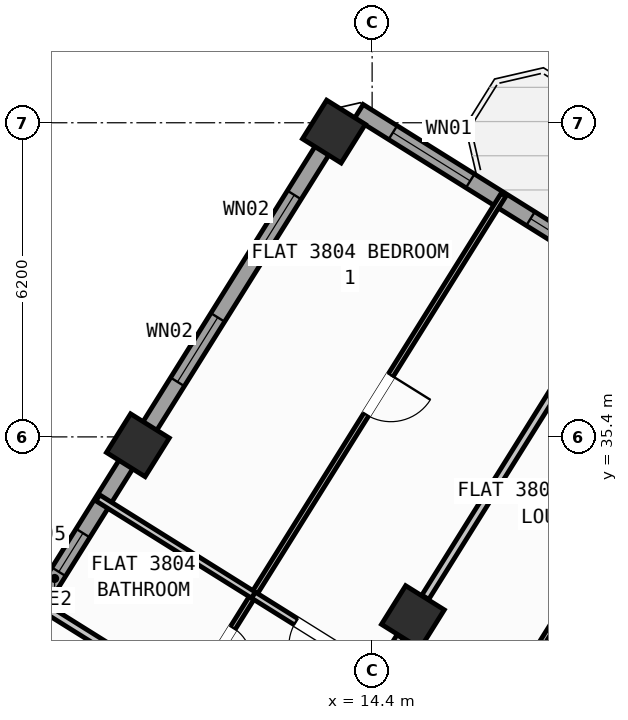
"""IFC4 building model, lengths in metres.
Left out: names, types, materials, properties, quantities, classifications, styles, units other than length and angle.
Written with IfcOpenShell. Run it as: python <this file> out.ifc"""

import sys

from ifc_helpers import new_model, si_unit, direction, frame, frame_2d, origin, origin_2d, place, context, subcontext, project, spatial, rectangle, hollow_rectangle, extrude, source, transform, mapped, element, fill, save


model = new_model("IFC4")
c1 = context("Model", 3, precision=1e-05, world=origin(), true_north=direction((0.0, 1.0)))
c2 = subcontext(c1, "Body", "Model", "MODEL_VIEW")
j1 = project(units=[si_unit("LENGTHUNIT", "METRE"), si_unit("PLANEANGLEUNIT", "RADIAN")], contexts=[c1])
p1 = place(None, origin())
s1 = spatial("IfcSite", under=j1, at=p1, CompositionType="ELEMENT")
p2 = place(p1, origin())
s2 = spatial("IfcBuilding", under=s1, at=p2, CompositionType="ELEMENT")
p3 = place(p2, frame((0.0, 0.0, 151.5)))
s3 = spatial("IfcBuildingStorey", under=s2, at=p3, CompositionType="ELEMENT", Elevation=151.5)
m1 = source(origin(), c2, "Body", "SweptSolid", [
    extrude(hollow_rectangle(XDim=0.9, YDim=0.9, WallThickness=0.036, at=origin_2d()), origin(), (0.0, 0.0, 1.0), 3.6),
])
for number, where, z_axis, x_axis in (
    (1, (15.205, 31.844, 0.0), (0.0, 0.0, 1.0), (-0.848, 0.53, 0.0)),
    (2, (13.646, 41.426, 0.0), (0.0, 0.0, 1.0), (-0.848, 0.53, 0.0)),
    (3, (9.777, 35.235, 0.0), (0.0, 0.0, 1.0), (-0.848, 0.53, 0.0)),
):
    element("IfcColumn", number, at=place(p3, frame(where, z_axis=z_axis, x_axis=x_axis)), inside=s3, PredefinedType="COLUMN", context=c2, shape_type="MappedRepresentation", body=[
        mapped(m1, transform((0.0, 0.0, 0.0), scale=1.0)),
    ])
p4 = place(p3, frame((2.415, 23.452, 0.0), z_axis=(0.0, 0.0, 1.0), x_axis=(0.52991049553, 0.848053575387, 0.0)))
e4 = element("IfcWall", 4, at=p4, inside=s3, PredefinedType="STANDARD", context=c2, shape_type="SweptSolid", body=[
    extrude(rectangle(XDim=21.587, YDim=0.32, at=frame_2d((10.794, 0.0))), origin(), (0.0, 0.0, 1.0), 2.775),
])
p5 = place(p4, frame((1.406, 0.0, 0.8)))
e5 = element("IfcOpeningElement", 5, at=p5, cuts=e4, PredefinedType="OPENING", context=c2, shape_type="SweptSolid", body=[
    extrude(rectangle(XDim=2.1, YDim=1.55, at=frame_2d((1.05, 0.775))), frame((0.0, 0.17, 0.0), z_axis=(0.0, -1.0, 0.0), x_axis=(1.0, 0.0, 0.0)), (0.0, 0.0, 1.0), 0.34),
])
p6 = place(p4, frame((10.949, 0.0, 1.0)))
e6 = element("IfcOpeningElement", 6, at=p6, cuts=e4, PredefinedType="OPENING", context=c2, shape_type="SweptSolid", body=[
    extrude(rectangle(XDim=0.9, YDim=1.25, at=frame_2d((0.45, 0.625))), frame((0.0, 0.17, 0.0), z_axis=(0.0, -1.0, 0.0), x_axis=(1.0, 0.0, 0.0)), (0.0, 0.0, 1.0), 0.34),
])
p7 = place(p4, frame((15.369, 0.0, 0.85)))
e7 = element("IfcOpeningElement", 7, at=p7, cuts=e4, PredefinedType="OPENING", context=c2, shape_type="SweptSolid", body=[
    extrude(rectangle(XDim=1.5, YDim=1.5, at=frame_2d((0.75, 0.75))), frame((0.0, 0.17, 0.0), z_axis=(0.0, -1.0, 0.0), x_axis=(1.0, 0.0, 0.0)), (0.0, 0.0, 1.0), 0.34),
])
p8 = place(p4, frame((18.219, 0.0, 0.85)))
e8 = element("IfcOpeningElement", 8, at=p8, cuts=e4, PredefinedType="OPENING", context=c2, shape_type="SweptSolid", body=[
    extrude(rectangle(XDim=1.5, YDim=1.5, at=frame_2d((0.75, 0.75))), frame((0.0, 0.17, 0.0), z_axis=(0.0, -1.0, 0.0), x_axis=(1.0, 0.0, 0.0)), (0.0, 0.0, 1.0), 0.34),
])
p9 = place(p3, frame((14.138, 41.825, 0.0), z_axis=(0.0, 0.0, 1.0), x_axis=(0.848046498049, -0.529921821731, 0.0)))
e9 = element("IfcWall", 9, at=p9, inside=s3, PredefinedType="STANDARD", context=c2, shape_type="SweptSolid", body=[
    extrude(rectangle(XDim=31.588, YDim=0.32, at=frame_2d((15.794, 0.0))), origin(), (0.0, 0.0, 1.0), 3.35),
])
p10 = place(p9, frame((9.792, 0.0, 0.0)))
e10 = element("IfcOpeningElement", 10, at=p10, cuts=e9, PredefinedType="OPENING", context=c2, shape_type="SweptSolid", body=[
    extrude(rectangle(XDim=1.05, YDim=2.15, at=frame_2d((0.525, 1.075))), frame((0.0, 0.17, 0.0), z_axis=(0.0, -1.0, 0.0), x_axis=(1.0, 0.0, 0.0)), (0.0, 0.0, 1.0), 0.34),
])
p11 = place(p9, frame((0.791, 0.0, 0.85)))
e11 = element("IfcOpeningElement", 11, at=p11, cuts=e9, PredefinedType="OPENING", context=c2, shape_type="SweptSolid", body=[
    extrude(rectangle(XDim=1.8, YDim=1.5, at=frame_2d((0.9, 0.75))), frame((0.0, 0.17, 0.0), z_axis=(0.0, -1.0, 0.0), x_axis=(1.0, 0.0, 0.0)), (0.0, 0.0, 1.0), 0.34),
])
p12 = place(p9, frame((3.996, 0.0, 0.95)))
e12 = element("IfcOpeningElement", 12, at=p12, cuts=e9, PredefinedType="OPENING", context=c2, shape_type="SweptSolid", body=[
    extrude(rectangle(XDim=1.2, YDim=1.4, at=frame_2d((0.6, 0.7))), frame((0.0, 0.17, 0.0), z_axis=(0.0, -1.0, 0.0), x_axis=(1.0, 0.0, 0.0)), (0.0, 0.0, 1.0), 0.34),
])
p13 = place(p9, frame((13.874, 0.0, 0.85)))
e13 = element("IfcOpeningElement", 13, at=p13, cuts=e9, PredefinedType="OPENING", context=c2, shape_type="SweptSolid", body=[
    extrude(rectangle(XDim=1.5, YDim=1.5, at=frame_2d((0.75, 0.75))), frame((0.0, 0.17, 0.0), z_axis=(0.0, -1.0, 0.0), x_axis=(1.0, 0.0, 0.0)), (0.0, 0.0, 1.0), 0.34),
])
p14 = place(p9, frame((17.104, 0.0, 1.0)))
e14 = element("IfcOpeningElement", 14, at=p14, cuts=e9, PredefinedType="OPENING", context=c2, shape_type="SweptSolid", body=[
    extrude(rectangle(XDim=0.9, YDim=1.25, at=frame_2d((0.45, 0.625))), frame((0.0, 0.17, 0.0), z_axis=(0.0, -1.0, 0.0), x_axis=(1.0, 0.0, 0.0)), (0.0, 0.0, 1.0), 0.34),
])
p15 = place(p9, frame((22.069, 0.0, 1.0)))
e15 = element("IfcOpeningElement", 15, at=p15, cuts=e9, PredefinedType="OPENING", context=c2, shape_type="SweptSolid", body=[
    extrude(rectangle(XDim=0.9, YDim=1.25, at=frame_2d((0.45, 0.625))), frame((0.0, 0.17, 0.0), z_axis=(0.0, -1.0, 0.0), x_axis=(1.0, 0.0, 0.0)), (0.0, 0.0, 1.0), 0.34),
])
p16 = place(p9, frame((27.519, 0.0, 1.0)))
e16 = element("IfcOpeningElement", 16, at=p16, cuts=e9, PredefinedType="OPENING", context=c2, shape_type="SweptSolid", body=[
    extrude(rectangle(XDim=0.9, YDim=1.25, at=frame_2d((0.45, 0.625))), frame((0.0, 0.17, 0.0), z_axis=(0.0, -1.0, 0.0), x_axis=(1.0, 0.0, 0.0)), (0.0, 0.0, 1.0), 0.34),
])
p17 = place(p3, frame((21.885, 23.306, 0.0), z_axis=(0.0, 0.0, 1.0), x_axis=(-0.848052408131, 0.529912363569, 0.0)))
e17 = element("IfcWall", 17, at=p17, inside=s3, PredefinedType="PARTITIONING", context=c2, shape_type="SweptSolid", body=[
    extrude(rectangle(XDim=16.73, YDim=0.16, at=frame_2d((8.365, 0.0))), origin(), (0.0, 0.0, 1.0), 3.34),
])
p18 = place(p17, frame((1.395, 0.0, 0.0)))
e18 = element("IfcOpeningElement", 18, at=p18, cuts=e17, PredefinedType="OPENING", context=c2, shape_type="SweptSolid", body=[
    extrude(rectangle(XDim=1.0, YDim=2.1, at=frame_2d((0.5, 1.05))), frame((0.0, 0.09, 0.0), z_axis=(0.0, -1.0, 0.0), x_axis=(1.0, 0.0, 0.0)), (0.0, 0.0, 1.0), 0.18),
])
p19 = place(p17, frame((7.82, 0.0, 0.0)))
e19 = element("IfcOpeningElement", 19, at=p19, cuts=e17, PredefinedType="OPENING", context=c2, shape_type="SweptSolid", body=[
    extrude(rectangle(XDim=1.0, YDim=2.1, at=frame_2d((0.5, 1.05))), frame((0.0, 0.09, 0.0), z_axis=(0.0, -1.0, 0.0), x_axis=(1.0, 0.0, 0.0)), (0.0, 0.0, 1.0), 0.18),
])
p20 = place(p17, frame((11.14, 0.0, 0.0)))
e20 = element("IfcOpeningElement", 20, at=p20, cuts=e17, PredefinedType="OPENING", context=c2, shape_type="SweptSolid", body=[
    extrude(rectangle(XDim=1.0, YDim=2.1, at=frame_2d((0.5, 1.05))), frame((0.0, 0.09, 0.0), z_axis=(0.0, -1.0, 0.0), x_axis=(1.0, 0.0, 0.0)), (0.0, 0.0, 1.0), 0.18),
])
p21 = place(p3, frame((18.828, 37.643, 0.0), z_axis=(0.0, 0.0, 1.0), x_axis=(-0.529930102756, -0.848041323399, 0.0)))
e21 = element("IfcWall", 21, at=p21, inside=s3, PredefinedType="PARTITIONING", context=c2, shape_type="SweptSolid", body=[
    extrude(rectangle(XDim=6.376, YDim=0.16, at=frame_2d((3.188, 0.0))), origin(), (0.0, 0.0, 1.0), 2.775),
])
p22 = place(p3, frame((14.96, 31.452, 0.0), z_axis=(0.0, 0.0, 1.0), x_axis=(-0.529924383291, -0.848044897393, 0.0)))
e22 = element("IfcWall", 22, at=p22, inside=s3, PredefinedType="PARTITIONING", context=c2, shape_type="SweptSolid", body=[
    extrude(rectangle(XDim=3.238, YDim=0.16, at=frame_2d((1.619, 0.0))), origin(), (0.0, 0.0, 1.0), 2.775),
])
p23 = place(p3, frame((21.517, 37.356, 0.0), z_axis=(0.0, 0.0, 1.0), x_axis=(-0.529919705034, -0.848047820713, 0.0)))
e23 = element("IfcWall", 23, at=p23, inside=s3, PredefinedType="PARTITIONING", context=c2, shape_type="SweptSolid", body=[
    extrude(rectangle(XDim=9.14, YDim=0.11, at=frame_2d((4.57, 0.0))), origin(), (0.0, 0.0, 1.0), 3.34),
])
p24 = place(p23, frame((0.47, 0.0, 0.0)))
e24 = element("IfcOpeningElement", 24, at=p24, cuts=e23, PredefinedType="OPENING", context=c2, shape_type="SweptSolid", body=[
    extrude(rectangle(XDim=0.92, YDim=2.08, at=frame_2d((0.46, 1.04))), frame((0.0, 0.065, 0.0), z_axis=(0.0, -1.0, 0.0), x_axis=(1.0, 0.0, 0.0)), (0.0, 0.0, 1.0), 0.13),
])
p25 = place(p3, frame((16.995, 40.182, 0.0), z_axis=(0.0, 0.0, 1.0), x_axis=(-0.529927783988, -0.848042772363, 0.0)))
e25 = element("IfcWall", 25, at=p25, inside=s3, PredefinedType="PARTITIONING", context=c2, shape_type="SweptSolid", body=[
    extrude(rectangle(XDim=11.72, YDim=0.11, at=frame_2d((5.86, 0.0))), origin(), (0.0, 0.0, 1.0), 3.34),
])
p26 = place(p25, frame((10.08, 0.0, 0.0)))
e26 = element("IfcOpeningElement", 26, at=p26, cuts=e25, PredefinedType="OPENING", context=c2, shape_type="SweptSolid", body=[
    extrude(rectangle(XDim=0.78, YDim=2.05, at=frame_2d((0.39, 1.025))), frame((0.0, 0.065, 0.0), z_axis=(0.0, -1.0, 0.0), x_axis=(1.0, 0.0, 0.0)), (0.0, 0.0, 1.0), 0.13),
])
p27 = place(p25, frame((4.2, 0.0, 0.0)))
e27 = element("IfcOpeningElement", 27, at=p27, cuts=e25, PredefinedType="OPENING", context=c2, shape_type="SweptSolid", body=[
    extrude(rectangle(XDim=0.92, YDim=2.08, at=frame_2d((0.46, 1.04))), frame((0.0, 0.065, 0.0), z_axis=(0.0, -1.0, 0.0), x_axis=(1.0, 0.0, 0.0)), (0.0, 0.0, 1.0), 0.13),
])
p28 = place(p3, frame((14.516, 30.741, 0.0), z_axis=(0.0, 0.0, 1.0), x_axis=(-0.848059786386, 0.529900555496, 0.0)))
e28 = element("IfcWall", 28, at=p28, inside=s3, PredefinedType="PLUMBINGWALL", context=c2, shape_type="SweptSolid", body=[
    extrude(rectangle(XDim=2.9, YDim=0.14, at=frame_2d((1.45, 0.0))), origin(), (0.0, 0.0, 1.0), 3.34),
])
p29 = place(p28, frame((0.99, 0.0, 0.0)))
e29 = element("IfcOpeningElement", 29, at=p29, cuts=e28, PredefinedType="OPENING", context=c2, shape_type="SweptSolid", body=[
    extrude(rectangle(XDim=0.92, YDim=2.08, at=frame_2d((0.46, 1.04))), frame((0.0, 0.08, 0.0), z_axis=(0.0, -1.0, 0.0), x_axis=(1.0, 0.0, 0.0)), (0.0, 0.0, 1.0), 0.16),
])
p30 = place(p3, frame((12.056, 32.278, 0.0), z_axis=(0.0, 0.0, 1.0), x_axis=(-0.848039976902, 0.529932257535, 0.0)))
e30 = element("IfcWall", 30, at=p30, inside=s3, PredefinedType="PLUMBINGWALL", context=c2, shape_type="SweptSolid", body=[
    extrude(rectangle(XDim=3.62, YDim=0.14, at=frame_2d((1.81, 0.0))), origin(), (0.0, 0.0, 1.0), 3.34),
])
m2 = source(origin(), c2, "Body", "SweptSolid", [
    extrude(rectangle(XDim=0.9, YDim=1.25, at=frame_2d((0.45, 0.625))), frame((0.0, 0.03, 0.0), z_axis=(0.0, -1.0, 0.0), x_axis=(1.0, 0.0, 0.0)), (0.0, 0.0, 1.0), 0.06),
])
p31 = place(p6, origin())
e31 = element("IfcWindow", 31, at=p31, inside=s3, PartitioningType="SINGLE_PANEL", PredefinedType="WINDOW", context=c2, shape_type="MappedRepresentation", body=[
    mapped(m2, transform((0.0, 0.0, 0.0), scale=1.0)),
])
fill(e6, e31)
m3 = source(origin(), c2, "Body", "SweptSolid", [
    extrude(rectangle(XDim=1.5, YDim=1.5, at=frame_2d((0.75, 0.75))), frame((0.0, 0.03, 0.0), z_axis=(0.0, -1.0, 0.0), x_axis=(1.0, 0.0, 0.0)), (0.0, 0.0, 1.0), 0.06),
])
p32 = place(p7, origin())
e32 = element("IfcWindow", 32, at=p32, inside=s3, PartitioningType="SINGLE_PANEL", PredefinedType="WINDOW", context=c2, shape_type="MappedRepresentation", body=[
    mapped(m3, transform((0.0, 0.0, 0.0), scale=1.0)),
])
fill(e7, e32)
p33 = place(p8, origin())
e33 = element("IfcWindow", 33, at=p33, inside=s3, PartitioningType="SINGLE_PANEL", PredefinedType="WINDOW", context=c2, shape_type="MappedRepresentation", body=[
    mapped(m3, transform((0.0, 0.0, 0.0), scale=1.0)),
])
fill(e8, e33)
m4 = source(origin(), c2, "Body", "SweptSolid", [
    extrude(rectangle(XDim=1.8, YDim=1.5, at=frame_2d((0.9, 0.75))), frame((0.0, 0.03, 0.0), z_axis=(0.0, -1.0, 0.0), x_axis=(1.0, 0.0, 0.0)), (0.0, 0.0, 1.0), 0.06),
])
p34 = place(p11, origin())
e34 = element("IfcWindow", 34, at=p34, inside=s3, PartitioningType="SINGLE_PANEL", PredefinedType="WINDOW", context=c2, shape_type="MappedRepresentation", body=[
    mapped(m4, transform((0.0, 0.0, 0.0), scale=1.0)),
])
fill(e11, e34)
m5 = source(origin(), c2, "Body", "SweptSolid", [
    extrude(rectangle(XDim=1.2, YDim=1.4, at=frame_2d((0.6, 0.7))), frame((0.0, 0.03, 0.0), z_axis=(0.0, -1.0, 0.0), x_axis=(1.0, 0.0, 0.0)), (0.0, 0.0, 1.0), 0.06),
])
p35 = place(p12, origin())
e35 = element("IfcWindow", 35, at=p35, inside=s3, PartitioningType="SINGLE_PANEL", PredefinedType="WINDOW", context=c2, shape_type="MappedRepresentation", body=[
    mapped(m5, transform((0.0, 0.0, 0.0), scale=1.0)),
])
fill(e12, e35)
m6 = source(origin(), c2, "Body", "SweptSolid", [
    extrude(rectangle(XDim=0.92, YDim=2.08, at=frame_2d((0.46, 1.04))), frame((0.0, 0.025, 0.0), z_axis=(0.0, -1.0, 0.0), x_axis=(1.0, 0.0, 0.0)), (0.0, 0.0, 1.0), 0.05),
])
p36 = place(p29, origin())
e36 = element("IfcDoor", 36, at=p36, inside=s3, OperationType="SINGLE_SWING_LEFT", PredefinedType="DOOR", context=c2, shape_type="MappedRepresentation", body=[
    mapped(m6, transform((0.0, 0.0, 0.0), scale=1.0)),
])
fill(e29, e36)
m7 = source(origin(), c2, "Body", "SweptSolid", [
    extrude(rectangle(XDim=0.78, YDim=2.05, at=frame_2d((0.39, 1.025))), frame((0.0, 0.025, 0.0), z_axis=(0.0, -1.0, 0.0), x_axis=(1.0, 0.0, 0.0)), (0.0, 0.0, 1.0), 0.05),
])
p37 = place(p26, origin())
e37 = element("IfcDoor", 37, at=p37, inside=s3, OperationType="SINGLE_SWING_RIGHT", PredefinedType="DOOR", context=c2, shape_type="MappedRepresentation", body=[
    mapped(m7, transform((0.0, 0.0, 0.0), scale=1.0)),
])
fill(e26, e37)
p38 = place(p27, origin())
e38 = element("IfcDoor", 38, at=p38, inside=s3, OperationType="SINGLE_SWING_LEFT", PredefinedType="DOOR", context=c2, shape_type="MappedRepresentation", body=[
    mapped(m6, transform((0.0, 0.0, 0.0), scale=1.0)),
])
fill(e27, e38)
save(model, sys.argv[1])
